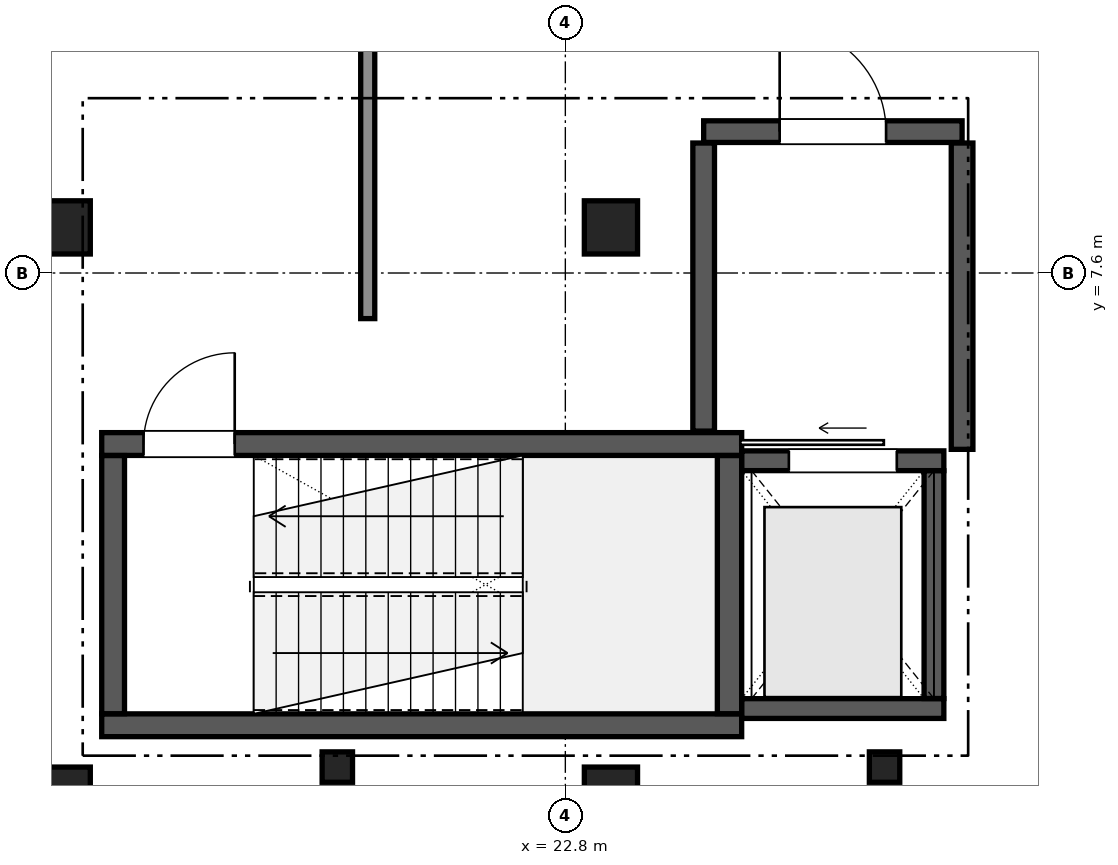
"""IFC4 building model, lengths in metres.
Left out: names, types, materials, properties, quantities, classifications, styles, units other than length and angle.
Written with IfcOpenShell. Run it as: python <this file> out.ifc"""

import sys

from ifc_helpers import new_model, si_unit, direction, frame, frame_2d, origin, origin_2d, place, context, subcontext, project, spatial, rectangle, extrude, element, fill, save


model = new_model("IFC4")
c1 = context("Model", 3, precision=1e-05, world=origin(), true_north=direction((0.0, 1.0)))
c2 = subcontext(c1, "Body", "Model", "MODEL_VIEW")
j1 = project(units=[si_unit("LENGTHUNIT", "METRE"), si_unit("PLANEANGLEUNIT", "RADIAN")], contexts=[c1])
p1 = place(None, origin())
s1 = spatial("IfcSite", under=j1, at=p1, CompositionType="ELEMENT")
p2 = place(p1, origin())
s2 = spatial("IfcBuilding", under=s1, at=p2, CompositionType="ELEMENT")
p3 = place(p2, frame((0.0, 0.0, 5.1)))
s3 = spatial("IfcBuildingStorey", under=s2, at=p3, CompositionType="ELEMENT", Elevation=5.1)
for number, where, z_axis, x_axis in (
    (1, (16.2, 0.75, 0.0), (0.0, 0.0, 1.0), (1.0, 0.0, 0.0)),
    (2, (16.2, 8.2, 0.0), (0.0, 0.0, 1.0), (1.0, 0.0, 0.0)),
    (3, (23.4, 0.75, 0.0), (0.0, 0.0, 1.0), (1.0, 0.0, 0.0)),
    (4, (23.4, 8.2, 0.0), (0.0, 0.0, 1.0), (1.0, 0.0, 0.0)),
):
    element("IfcColumn", number, at=place(p3, frame(where, z_axis=z_axis, x_axis=x_axis)), inside=s3, PredefinedType="COLUMN", context=c2, shape_type="SweptSolid", body=[
        extrude(rectangle(XDim=0.7, YDim=0.7, at=origin_2d()), origin(), (0.0, 0.0, 1.0), 4.42),
    ])
for number, where, z_axis, x_axis in (
    (5, (19.8, 1.1, 0.0), (0.0, 0.0, 1.0), (1.0, 0.0, 0.0)),
    (6, (27.0, 1.1, 0.0), (0.0, 0.0, 1.0), (1.0, 0.0, 0.0)),
):
    element("IfcColumn", number, at=place(p3, frame(where, z_axis=z_axis, x_axis=x_axis)), inside=s3, PredefinedType="PILASTER", context=c2, shape_type="SweptSolid", body=[
        extrude(rectangle(XDim=0.4, YDim=0.4, at=origin_2d()), origin(), (0.0, 0.0, 1.0), 4.42),
    ])
p4 = place(p3, frame((16.7, 1.65, 0.0), z_axis=(0.0, 0.0, 1.0), x_axis=(1.0, 0.0, 0.0)))
e7 = element("IfcWall", 7, at=p4, inside=s3, PredefinedType="SHEAR", context=c2, shape_type="SweptSolid", body=[
    extrude(rectangle(XDim=8.42, YDim=0.3, at=frame_2d((4.21, 0.0))), origin(), (0.0, 0.0, 1.0), 4.075),
])
p5 = place(p3, frame((16.7, 5.35, 0.0), z_axis=(0.0, 0.0, 1.0), x_axis=(1.0, 0.0, 0.0)))
e8 = element("IfcWall", 8, at=p5, inside=s3, PredefinedType="SHEAR", context=c2, shape_type="SweptSolid", body=[
    extrude(rectangle(XDim=8.42, YDim=0.3, at=frame_2d((4.21, 0.0))), origin(), (0.0, 0.0, 1.0), 4.075),
])
p6 = place(p5, frame((0.55, 0.0, 0.0)))
e9 = element("IfcOpeningElement", 9, at=p6, cuts=e8, PredefinedType="OPENING", context=c2, shape_type="SweptSolid", body=[
    extrude(rectangle(XDim=1.2, YDim=2.2, at=frame_2d((0.6, 1.1))), frame((0.0, 0.16, 0.0), z_axis=(0.0, -1.0, 0.0), x_axis=(1.0, 0.0, 0.0)), (0.0, 0.0, 1.0), 0.32),
])
p7 = place(p3, frame((16.85, 1.802, 0.0), z_axis=(0.0, 0.0, 1.0), x_axis=(0.0, 1.0, 0.0)))
e10 = element("IfcWall", 10, at=p7, inside=s3, PredefinedType="SHEAR", context=c2, shape_type="SweptSolid", body=[
    extrude(rectangle(XDim=3.396, YDim=0.3, at=frame_2d((1.698, 0.0))), origin(), (0.0, 0.0, 1.0), 4.075),
])
p8 = place(p3, frame((24.96, 1.802, 0.0), z_axis=(0.0, 0.0, 1.0), x_axis=(0.0, 1.0, 0.0)))
e11 = element("IfcWall", 11, at=p8, inside=s3, PredefinedType="SHEAR", context=c2, shape_type="SweptSolid", body=[
    extrude(rectangle(XDim=3.396, YDim=0.32, at=frame_2d((1.698, 0.0))), origin(), (0.0, 0.0, 1.0), 4.075),
])
p9 = place(p3, frame((25.122, 1.87, 0.0), z_axis=(0.0, 0.0, 1.0), x_axis=(1.0, 0.0, 0.0)))
e12 = element("IfcWall", 12, at=p9, inside=s3, PredefinedType="SHEAR", context=c2, shape_type="SweptSolid", body=[
    extrude(rectangle(XDim=2.658, YDim=0.26, at=frame_2d((1.329, 0.0))), origin(), (0.0, 0.0, 1.0), 4.075),
])
p10 = place(p3, frame((25.122, 5.13, 0.0), z_axis=(0.0, 0.0, 1.0), x_axis=(1.0, 0.0, 0.0)))
e13 = element("IfcWall", 13, at=p10, inside=s3, PredefinedType="SHEAR", context=c2, shape_type="SweptSolid", body=[
    extrude(rectangle(XDim=2.658, YDim=0.26, at=frame_2d((1.329, 0.0))), origin(), (0.0, 0.0, 1.0), 4.075),
])
p11 = place(p10, frame((0.619, 0.0, 0.0)))
e14 = element("IfcOpeningElement", 14, at=p11, cuts=e13, PredefinedType="OPENING", context=c2, shape_type="SweptSolid", body=[
    extrude(rectangle(XDim=1.42, YDim=2.25, at=frame_2d((0.71, 1.125))), frame((0.0, 0.14, 0.0), z_axis=(0.0, -1.0, 0.0), x_axis=(1.0, 0.0, 0.0)), (0.0, 0.0, 1.0), 0.28),
])
p12 = place(p3, frame((27.65, 2.002, 0.0), z_axis=(0.0, 0.0, 1.0), x_axis=(0.0, 1.0, 0.0)))
e15 = element("IfcWall", 15, at=p12, inside=s3, PredefinedType="SHEAR", context=c2, shape_type="SweptSolid", body=[
    extrude(rectangle(XDim=2.996, YDim=0.26, at=frame_2d((1.498, 0.0))), origin(), (0.0, 0.0, 1.0), 4.075),
])
p13 = place(p3, frame((24.62, 9.46, 0.0), z_axis=(0.0, 0.0, 1.0), x_axis=(1.0, 0.0, 0.0)))
e16 = element("IfcWall", 16, at=p13, inside=s3, PredefinedType="SHEAR", context=c2, shape_type="SweptSolid", body=[
    extrude(rectangle(XDim=3.4, YDim=0.285, at=frame_2d((1.7, 0.0))), origin(), (0.0, 0.0, 1.0), 4.075),
])
p14 = place(p13, frame((1.0, 0.0, 0.0)))
e17 = element("IfcOpeningElement", 17, at=p14, cuts=e16, PredefinedType="OPENING", context=c2, shape_type="SweptSolid", body=[
    extrude(rectangle(XDim=1.4, YDim=2.25, at=frame_2d((0.7, 1.125))), frame((0.0, 0.152, 0.0), z_axis=(0.0, -1.0, 0.0), x_axis=(1.0, 0.0, 0.0)), (0.0, 0.0, 1.0), 0.305),
])
p15 = place(p3, frame((24.62, 5.52, 0.0), z_axis=(0.0, 0.0, 1.0), x_axis=(0.0, 1.0, 0.0)))
e18 = element("IfcWall", 18, at=p15, inside=s3, PredefinedType="SHEAR", context=c2, shape_type="SweptSolid", body=[
    extrude(rectangle(XDim=3.79, YDim=0.285, at=frame_2d((1.895, 0.0))), origin(), (0.0, 0.0, 1.0), 3.125),
])
p16 = place(p3, frame((28.02, 5.28, 0.0), z_axis=(0.0, 0.0, 1.0), x_axis=(0.0, 1.0, 0.0)))
e19 = element("IfcWall", 19, at=p16, inside=s3, PredefinedType="SHEAR", context=c2, shape_type="SweptSolid", body=[
    extrude(rectangle(XDim=4.03, YDim=0.285, at=frame_2d((2.015, 0.0))), origin(), (0.0, 0.0, 1.0), 3.125),
])
p17 = place(p3, frame((20.2, 7.0, 0.0), z_axis=(0.0, 0.0, 1.0), x_axis=(0.0, 1.0, 0.0)))
e20 = element("IfcWall", 20, at=p17, inside=s3, PredefinedType="PARTITIONING", context=c2, shape_type="SweptSolid", body=[
    extrude(rectangle(XDim=4.75, YDim=0.185, at=frame_2d((2.375, 0.0))), origin(), (0.0, 0.0, 1.0), 3.125),
])
p18 = place(p6, origin())
e21 = element("IfcDoor", 21, at=p18, inside=s3, OperationType="SINGLE_SWING_RIGHT", PredefinedType="DOOR", context=c2, shape_type="SweptSolid", body=[
    extrude(rectangle(XDim=1.2, YDim=2.2, at=frame_2d((0.6, 1.1))), frame((0.0, 0.025, 0.0), z_axis=(0.0, -1.0, 0.0), x_axis=(1.0, 0.0, 0.0)), (0.0, 0.0, 1.0), 0.05),
])
fill(e9, e21)
p19 = place(p11, origin())
e22 = element("IfcDoor", 22, at=p19, inside=s3, OperationType="SLIDING_TO_LEFT", PredefinedType="DOOR", context=c2, shape_type="SweptSolid", body=[
    extrude(rectangle(XDim=1.42, YDim=2.25, at=frame_2d((0.71, 1.125))), frame((0.0, 0.025, 0.0), z_axis=(0.0, -1.0, 0.0), x_axis=(1.0, 0.0, 0.0)), (0.0, 0.0, 1.0), 0.05),
])
fill(e14, e22)
p20 = place(p14, origin())
e23 = element("IfcDoor", 23, at=p20, inside=s3, OperationType="SINGLE_SWING_LEFT", PredefinedType="DOOR", context=c2, shape_type="SweptSolid", body=[
    extrude(rectangle(XDim=1.4, YDim=2.25, at=frame_2d((0.7, 1.125))), frame((0.0, 0.025, 0.0), z_axis=(0.0, -1.0, 0.0), x_axis=(1.0, 0.0, 0.0)), (0.0, 0.0, 1.0), 0.05),
])
fill(e17, e23)
save(model, sys.argv[1])
